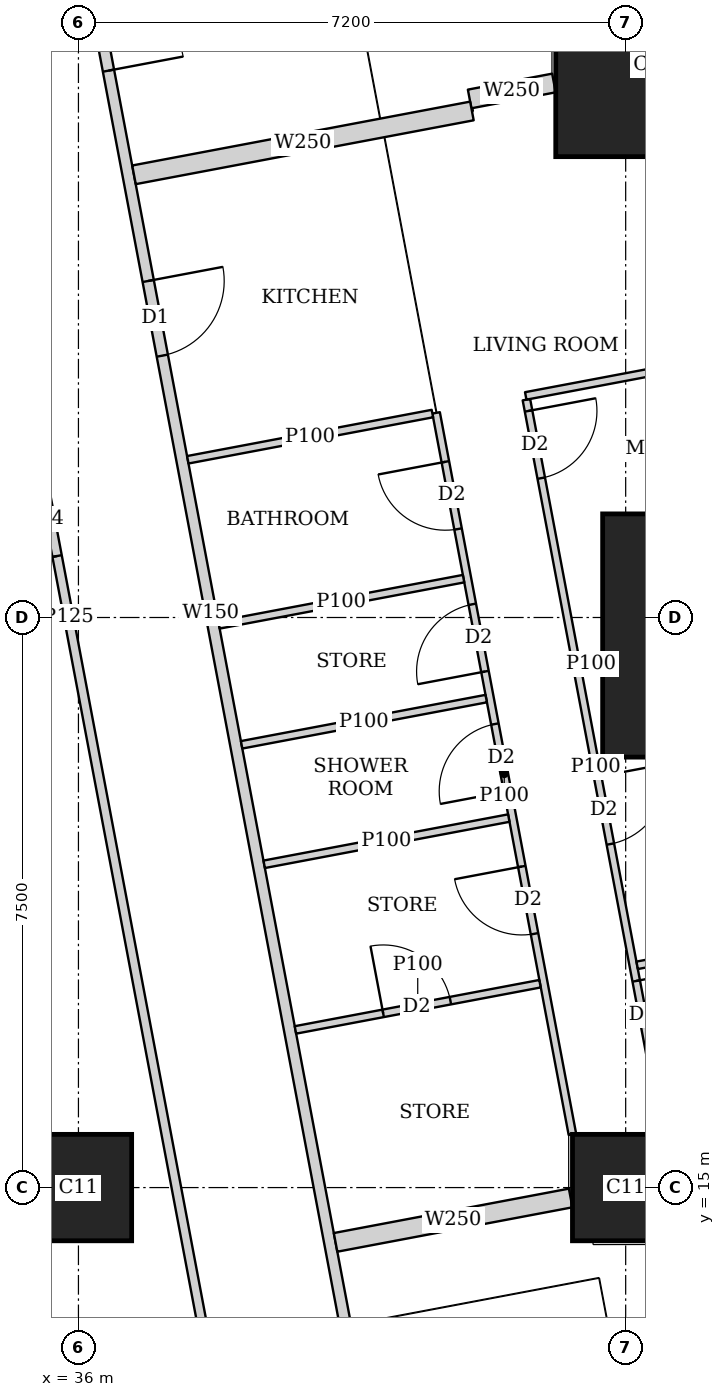
"""IFC4 building model, lengths in metres.
Left out: names, types, materials, properties, quantities, classifications, styles, units other than length and angle.
Written with IfcOpenShell. Run it as: python <this file> out.ifc"""

import sys

from ifc_helpers import new_model, si_unit, direction, frame, frame_2d, origin, origin_2d, place, context, subcontext, project, spatial, rectangle, extrude, element, fill, save


model = new_model("IFC4")
c1 = context("Model", 3, precision=1e-05, world=origin(), true_north=direction((0.0, 1.0)))
c2 = subcontext(c1, "Body", "Model", "MODEL_VIEW")
j1 = project(units=[si_unit("LENGTHUNIT", "METRE"), si_unit("PLANEANGLEUNIT", "RADIAN")], contexts=[c1])
p1 = place(None, origin())
s1 = spatial("IfcSite", under=j1, at=p1, CompositionType="ELEMENT")
p2 = place(p1, origin())
s2 = spatial("IfcBuilding", under=s1, at=p2, CompositionType="ELEMENT")
p3 = place(p2, frame((0.0, 0.0, 234.95)))
s3 = spatial("IfcBuildingStorey", under=s2, at=p3, CompositionType="ELEMENT", Elevation=234.95)
for number, where, z_axis, x_axis in (
    (1, (36.0, 15.0, 0.0), (0.0, 0.0, 1.0), (1.0, 0.0, 0.0)),
    (2, (43.2, 15.0, 0.0), (0.0, 0.0, 1.0), (1.0, 0.0, 0.0)),
):
    element("IfcColumn", number, at=place(p3, frame(where, z_axis=z_axis, x_axis=x_axis)), inside=s3, PredefinedType="COLUMN", context=c2, shape_type="SweptSolid", body=[
        extrude(rectangle(XDim=1.4, YDim=1.4, at=origin_2d()), origin(), (0.0, 0.0, 1.0), 3.75),
    ])
p4 = place(p3, frame((44.697, 22.263, 0.0), z_axis=(0.0, 0.0, 1.0), x_axis=(1.0, 0.0, 0.0)))
e3 = element("IfcColumn", 3, at=p4, inside=s3, PredefinedType="COLUMN", context=c2, shape_type="SweptSolid", body=[
    extrude(rectangle(XDim=3.6, YDim=3.2, at=origin_2d()), origin(), (0.0, 0.0, 1.0), 3.75),
])
p5 = place(p3, frame((43.48, 29.763, 0.0), z_axis=(0.0, 0.0, 1.0), x_axis=(1.0, 0.0, 0.0)))
e4 = element("IfcColumn", 4, at=p5, inside=s3, PredefinedType="COLUMN", context=c2, shape_type="SweptSolid", body=[
    extrude(rectangle(XDim=2.4, YDim=2.4, at=origin_2d()), origin(), (0.0, 0.0, 1.0), 3.75),
])
p6 = place(p3, frame((50.653, 2.703, 0.0), z_axis=(0.0, 0.0, 1.0), x_axis=(-0.185612026696, 0.982623109613, 0.0)))
e5 = element("IfcWall", 5, at=p6, inside=s3, PredefinedType="SOLIDWALL", context=c2, shape_type="SweptSolid", body=[
    extrude(rectangle(XDim=41.393, YDim=0.2, at=frame_2d((20.697, 0.0))), origin(), (0.0, 0.0, 1.0), 3.5),
])
p7 = place(p6, frame((1.633, 0.0, 0.9)))
e6 = element("IfcOpeningElement", 6, at=p7, cuts=e5, PredefinedType="OPENING", context=c2, shape_type="SweptSolid", body=[
    extrude(rectangle(XDim=1.8, YDim=1.5, at=frame_2d((0.9, 0.75))), frame((0.0, 0.11, 0.0), z_axis=(0.0, -1.0, 0.0), x_axis=(1.0, 0.0, 0.0)), (0.0, 0.0, 1.0), 0.22),
])
p8 = place(p6, frame((6.032, 0.0, 0.9)))
e7 = element("IfcOpeningElement", 7, at=p8, cuts=e5, PredefinedType="OPENING", context=c2, shape_type="SweptSolid", body=[
    extrude(rectangle(XDim=1.8, YDim=1.5, at=frame_2d((0.9, 0.75))), frame((0.0, 0.11, 0.0), z_axis=(0.0, -1.0, 0.0), x_axis=(1.0, 0.0, 0.0)), (0.0, 0.0, 1.0), 0.22),
])
p9 = place(p6, frame((9.848, 0.0, 0.9)))
e8 = element("IfcOpeningElement", 8, at=p9, cuts=e5, PredefinedType="OPENING", context=c2, shape_type="SweptSolid", body=[
    extrude(rectangle(XDim=1.8, YDim=1.5, at=frame_2d((0.9, 0.75))), frame((0.0, 0.11, 0.0), z_axis=(0.0, -1.0, 0.0), x_axis=(1.0, 0.0, 0.0)), (0.0, 0.0, 1.0), 0.22),
])
p10 = place(p6, frame((13.664, 0.0, 0.9)))
e9 = element("IfcOpeningElement", 9, at=p10, cuts=e5, PredefinedType="OPENING", context=c2, shape_type="SweptSolid", body=[
    extrude(rectangle(XDim=1.8, YDim=1.5, at=frame_2d((0.9, 0.75))), frame((0.0, 0.11, 0.0), z_axis=(0.0, -1.0, 0.0), x_axis=(1.0, 0.0, 0.0)), (0.0, 0.0, 1.0), 0.22),
])
p11 = place(p6, frame((17.481, 0.0, 0.9)))
e10 = element("IfcOpeningElement", 10, at=p11, cuts=e5, PredefinedType="OPENING", context=c2, shape_type="SweptSolid", body=[
    extrude(rectangle(XDim=1.8, YDim=1.5, at=frame_2d((0.9, 0.75))), frame((0.0, 0.11, 0.0), z_axis=(0.0, -1.0, 0.0), x_axis=(1.0, 0.0, 0.0)), (0.0, 0.0, 1.0), 0.22),
])
p12 = place(p6, frame((21.297, 0.0, 0.9)))
e11 = element("IfcOpeningElement", 11, at=p12, cuts=e5, PredefinedType="OPENING", context=c2, shape_type="SweptSolid", body=[
    extrude(rectangle(XDim=1.8, YDim=1.5, at=frame_2d((0.9, 0.75))), frame((0.0, 0.11, 0.0), z_axis=(0.0, -1.0, 0.0), x_axis=(1.0, 0.0, 0.0)), (0.0, 0.0, 1.0), 0.22),
])
p13 = place(p6, frame((25.113, 0.0, 0.9)))
e12 = element("IfcOpeningElement", 12, at=p13, cuts=e5, PredefinedType="OPENING", context=c2, shape_type="SweptSolid", body=[
    extrude(rectangle(XDim=1.8, YDim=1.5, at=frame_2d((0.9, 0.75))), frame((0.0, 0.11, 0.0), z_axis=(0.0, -1.0, 0.0), x_axis=(1.0, 0.0, 0.0)), (0.0, 0.0, 1.0), 0.22),
])
p14 = place(p6, frame((28.93, 0.0, 0.9)))
e13 = element("IfcOpeningElement", 13, at=p14, cuts=e5, PredefinedType="OPENING", context=c2, shape_type="SweptSolid", body=[
    extrude(rectangle(XDim=1.8, YDim=1.5, at=frame_2d((0.9, 0.75))), frame((0.0, 0.11, 0.0), z_axis=(0.0, -1.0, 0.0), x_axis=(1.0, 0.0, 0.0)), (0.0, 0.0, 1.0), 0.22),
])
p15 = place(p6, frame((32.746, 0.0, 0.9)))
e14 = element("IfcOpeningElement", 14, at=p15, cuts=e5, PredefinedType="OPENING", context=c2, shape_type="SweptSolid", body=[
    extrude(rectangle(XDim=1.8, YDim=1.5, at=frame_2d((0.9, 0.75))), frame((0.0, 0.11, 0.0), z_axis=(0.0, -1.0, 0.0), x_axis=(1.0, 0.0, 0.0)), (0.0, 0.0, 1.0), 0.22),
])
p16 = place(p6, frame((36.481, 0.0, 0.9)))
e15 = element("IfcOpeningElement", 15, at=p16, cuts=e5, PredefinedType="OPENING", context=c2, shape_type="SweptSolid", body=[
    extrude(rectangle(XDim=1.8, YDim=1.5, at=frame_2d((0.9, 0.75))), frame((0.0, 0.11, 0.0), z_axis=(0.0, -1.0, 0.0), x_axis=(1.0, 0.0, 0.0)), (0.0, 0.0, 1.0), 0.22),
])
p17 = place(p3, frame((33.933, 42.73, 0.0), z_axis=(0.0, 0.0, 1.0), x_axis=(0.185595417643, -0.982626246825, 0.0)))
e16 = element("IfcWall", 16, at=p17, inside=s3, PredefinedType="SOLIDWALL", context=c2, shape_type="SweptSolid", body=[
    extrude(rectangle(XDim=41.051, YDim=0.15, at=frame_2d((20.525, 0.0))), origin(), (0.0, 0.0, 1.0), 2.5),
])
p18 = place(p17, frame((12.266, 0.0, 0.0)))
e17 = element("IfcOpeningElement", 17, at=p18, cuts=e16, PredefinedType="OPENING", context=c2, shape_type="SweptSolid", body=[
    extrude(rectangle(XDim=1.0, YDim=2.1, at=frame_2d((0.5, 1.05))), frame((0.0, 0.085, 0.0), z_axis=(0.0, -1.0, 0.0), x_axis=(1.0, 0.0, 0.0)), (0.0, 0.0, 1.0), 0.17),
])
p19 = place(p17, frame((16.082, 0.0, 0.0)))
e18 = element("IfcOpeningElement", 18, at=p19, cuts=e16, PredefinedType="OPENING", context=c2, shape_type="SweptSolid", body=[
    extrude(rectangle(XDim=1.0, YDim=2.1, at=frame_2d((0.5, 1.05))), frame((0.0, 0.085, 0.0), z_axis=(0.0, -1.0, 0.0), x_axis=(1.0, 0.0, 0.0)), (0.0, 0.0, 1.0), 0.17),
])
p20 = place(p17, frame((30.862, 0.0, 0.0)))
e19 = element("IfcOpeningElement", 19, at=p20, cuts=e16, PredefinedType="OPENING", context=c2, shape_type="SweptSolid", body=[
    extrude(rectangle(XDim=1.0, YDim=2.1, at=frame_2d((0.5, 1.05))), frame((0.0, 0.085, 0.0), z_axis=(0.0, -1.0, 0.0), x_axis=(1.0, 0.0, 0.0)), (0.0, 0.0, 1.0), 0.17),
])
p21 = place(p3, frame((41.894, 25.366, 0.0), z_axis=(0.0, 0.0, 1.0), x_axis=(0.185612905165, -0.982622943675, 0.0)))
e20 = element("IfcWall", 20, at=p21, inside=s3, PredefinedType="PARTITIONING", context=c2, shape_type="SweptSolid", body=[
    extrude(rectangle(XDim=9.827, YDim=0.1, at=frame_2d((4.913, 0.0))), origin(), (0.0, 0.0, 1.0), 2.5),
])
p22 = place(p21, frame((0.151, 0.0, 0.0)))
e21 = element("IfcOpeningElement", 21, at=p22, cuts=e20, PredefinedType="OPENING", context=c2, shape_type="SweptSolid", body=[
    extrude(rectangle(XDim=0.9, YDim=2.1, at=frame_2d((0.45, 1.05))), frame((0.0, 0.06, 0.0), z_axis=(0.0, -1.0, 0.0), x_axis=(1.0, 0.0, 0.0)), (0.0, 0.0, 1.0), 0.12),
])
p23 = place(p21, frame((5.05, 0.0, 0.0)))
e22 = element("IfcOpeningElement", 22, at=p23, cuts=e20, PredefinedType="OPENING", context=c2, shape_type="SweptSolid", body=[
    extrude(rectangle(XDim=0.9, YDim=2.1, at=frame_2d((0.45, 1.05))), frame((0.0, 0.06, 0.0), z_axis=(0.0, -1.0, 0.0), x_axis=(1.0, 0.0, 0.0)), (0.0, 0.0, 1.0), 0.12),
])
p24 = place(p21, frame((7.783, 0.0, 0.0)))
e23 = element("IfcOpeningElement", 23, at=p24, cuts=e20, PredefinedType="OPENING", context=c2, shape_type="SweptSolid", body=[
    extrude(rectangle(XDim=0.9, YDim=2.1, at=frame_2d((0.45, 1.05))), frame((0.0, 0.06, 0.0), z_axis=(0.0, -1.0, 0.0), x_axis=(1.0, 0.0, 0.0)), (0.0, 0.0, 1.0), 0.12),
])
p25 = place(p3, frame((40.706, 25.192, 0.0), z_axis=(0.0, 0.0, 1.0), x_axis=(0.185629824463, -0.982619747547, 0.0)))
e24 = element("IfcWall", 24, at=p25, inside=s3, PredefinedType="PARTITIONING", context=c2, shape_type="SweptSolid", body=[
    extrude(rectangle(XDim=9.659, YDim=0.1, at=frame_2d((4.83, 0.0))), origin(), (0.0, 0.0, 1.0), 2.5),
])
p26 = place(p25, frame((0.655, 0.0, 0.0)))
e25 = element("IfcOpeningElement", 25, at=p26, cuts=e24, PredefinedType="OPENING", context=c2, shape_type="SweptSolid", body=[
    extrude(rectangle(XDim=0.9, YDim=2.1, at=frame_2d((0.45, 1.05))), frame((0.0, 0.06, 0.0), z_axis=(0.0, -1.0, 0.0), x_axis=(1.0, 0.0, 0.0)), (0.0, 0.0, 1.0), 0.12),
])
p27 = place(p25, frame((4.166, 0.0, 0.0)))
e26 = element("IfcOpeningElement", 26, at=p27, cuts=e24, PredefinedType="OPENING", context=c2, shape_type="SweptSolid", body=[
    extrude(rectangle(XDim=0.9, YDim=2.1, at=frame_2d((0.45, 1.05))), frame((0.0, 0.06, 0.0), z_axis=(0.0, -1.0, 0.0), x_axis=(1.0, 0.0, 0.0)), (0.0, 0.0, 1.0), 0.12),
])
p28 = place(p25, frame((2.563, 0.0, 0.0)))
e27 = element("IfcOpeningElement", 27, at=p28, cuts=e24, PredefinedType="OPENING", context=c2, shape_type="SweptSolid", body=[
    extrude(rectangle(XDim=0.9, YDim=2.1, at=frame_2d((0.45, 1.05))), frame((0.0, 0.06, 0.0), z_axis=(0.0, -1.0, 0.0), x_axis=(1.0, 0.0, 0.0)), (0.0, 0.0, 1.0), 0.12),
])
p29 = place(p25, frame((6.074, 0.0, 0.0)))
e28 = element("IfcOpeningElement", 28, at=p29, cuts=e24, PredefinedType="OPENING", context=c2, shape_type="SweptSolid", body=[
    extrude(rectangle(XDim=0.9, YDim=2.1, at=frame_2d((0.45, 1.05))), frame((0.0, 0.06, 0.0), z_axis=(0.0, -1.0, 0.0), x_axis=(1.0, 0.0, 0.0)), (0.0, 0.0, 1.0), 0.12),
])
p30 = place(p3, frame((46.11, 26.213, 0.0), z_axis=(0.0, 0.0, 1.0), x_axis=(-0.982633535512, -0.185556823879, 0.0)))
e29 = element("IfcWall", 29, at=p30, inside=s3, PredefinedType="PARTITIONING", context=c2, shape_type="SweptSolid", body=[
    extrude(rectangle(XDim=4.3, YDim=0.1, at=frame_2d((2.15, 0.0))), origin(), (0.0, 0.0, 1.0), 2.05),
])
p31 = place(p3, frame((42.887, 21.921, 0.0), z_axis=(0.0, 0.0, 1.0), x_axis=(-0.982688058078, -0.185267861514, 0.0)))
e30 = element("IfcWall", 30, at=p31, inside=s3, PredefinedType="PARTITIONING", context=c2, shape_type="SweptSolid", body=[
    extrude(rectangle(XDim=0.286, YDim=0.1, at=frame_2d((0.143, 0.0))), origin(), (0.0, 0.0, 1.0), 2.5),
])
p32 = place(p3, frame((47.527, 18.712, 0.0), z_axis=(0.0, 0.0, 1.0), x_axis=(-0.982665405803, -0.185387972203, 0.0)))
e31 = element("IfcWall", 31, at=p32, inside=s3, PredefinedType="PARTITIONING", context=c2, shape_type="SweptSolid", body=[
    extrude(rectangle(XDim=4.25, YDim=0.1, at=frame_2d((2.125, 0.0))), origin(), (0.0, 0.0, 1.0), 2.05),
])
for number, where, z_axis, x_axis in (
    (32, (40.657, 25.183, 0.0), (0.0, 0.0, 1.0), (-0.983, -0.186, 0.0)),
    (33, (41.365, 21.433, 0.0), (0.0, 0.0, 1.0), (-0.983, -0.186, 0.0)),
):
    element("IfcWall", number, at=place(p3, frame(where, z_axis=z_axis, x_axis=x_axis)), inside=s3, PredefinedType="PARTITIONING", context=c2, shape_type="SweptSolid", body=[
        extrude(rectangle(XDim=3.275, YDim=0.1, at=frame_2d((1.637, 0.0))), origin(), (0.0, 0.0, 1.0), 3.5),
    ])
p33 = place(p3, frame((42.073, 17.682, 0.0), z_axis=(0.0, 0.0, 1.0), x_axis=(-0.982620626894, -0.185625169636, 0.0)))
e34 = element("IfcWall", 34, at=p33, inside=s3, PredefinedType="PARTITIONING", context=c2, shape_type="SweptSolid", body=[
    extrude(rectangle(XDim=3.275, YDim=0.1, at=frame_2d((1.637, 0.0))), origin(), (0.0, 0.0, 1.0), 3.5),
])
p34 = place(p33, frame((1.2, 0.0, 0.0)))
e35 = element("IfcOpeningElement", 35, at=p34, cuts=e34, PredefinedType="OPENING", context=c2, shape_type="SweptSolid", body=[
    extrude(rectangle(XDim=0.9, YDim=2.1, at=frame_2d((0.45, 1.05))), frame((0.0, 0.06, 0.0), z_axis=(0.0, -1.0, 0.0), x_axis=(1.0, 0.0, 0.0)), (0.0, 0.0, 1.0), 0.12),
])
p35 = place(p3, frame((41.067, 23.011, 0.0), z_axis=(0.0, 0.0, 1.0), x_axis=(-0.982618057925, -0.185638768151, 0.0)))
e36 = element("IfcWall", 36, at=p35, inside=s3, PredefinedType="PARTITIONING", context=c2, shape_type="SweptSolid", body=[
    extrude(rectangle(XDim=3.275, YDim=0.1, at=frame_2d((1.637, 0.0))), origin(), (0.0, 0.0, 1.0), 2.5),
])
p36 = place(p3, frame((41.662, 19.861, 0.0), z_axis=(0.0, 0.0, 1.0), x_axis=(-0.982607026909, -0.185697147715, 0.0)))
e37 = element("IfcWall", 37, at=p36, inside=s3, PredefinedType="PARTITIONING", context=c2, shape_type="SweptSolid", body=[
    extrude(rectangle(XDim=3.275, YDim=0.1, at=frame_2d((1.637, 0.0))), origin(), (0.0, 0.0, 1.0), 3.5),
])
p37 = place(p3, frame((42.256, 29.532, 0.0), z_axis=(0.0, 0.0, 1.0), x_axis=(-0.982549954272, -0.185998890749, 0.0)))
e38 = element("IfcWall", 38, at=p37, inside=s3, PredefinedType="SOLIDWALL", context=c2, shape_type="SweptSolid", body=[
    extrude(rectangle(XDim=1.129, YDim=0.25, at=frame_2d((0.564, 0.0))), origin(), (0.0, 0.0, 1.0), 2.05),
])
p38 = place(p3, frame((41.177, 29.164, 0.0), z_axis=(0.0, 0.0, 1.0), x_axis=(-0.982612837616, -0.185666398014, 0.0)))
e39 = element("IfcWall", 39, at=p38, inside=s3, PredefinedType="SOLIDWALL", context=c2, shape_type="SweptSolid", body=[
    extrude(rectangle(XDim=4.525, YDim=0.25, at=frame_2d((2.262, 0.0))), origin(), (0.0, 0.0, 1.0), 2.5),
])
p39 = place(p3, frame((42.476, 14.863, 0.0), z_axis=(0.0, 0.0, 1.0), x_axis=(-0.982638716117, -0.185529387398, 0.0)))
e40 = element("IfcWall", 40, at=p39, inside=s3, PredefinedType="SOLIDWALL", context=c2, shape_type="SweptSolid", body=[
    extrude(rectangle(XDim=3.148, YDim=0.25, at=frame_2d((1.574, 0.0))), origin(), (0.0, 0.0, 1.0), 3.5),
])
p40 = place(p3, frame((38.202, 10.163, 0.0), z_axis=(0.0, 0.0, 1.0), x_axis=(-0.185610321132, 0.982623431783, 0.0)))
e41 = element("IfcWall", 41, at=p40, inside=s3, PredefinedType="PARTITIONING", context=c2, shape_type="SweptSolid", body=[
    extrude(rectangle(XDim=25.111, YDim=0.125, at=frame_2d((12.556, 0.0))), origin(), (0.0, 0.0, 1.0), 2.5),
])
p41 = place(p40, frame((0.708, 0.0, 0.0)))
e42 = element("IfcOpeningElement", 42, at=p41, cuts=e41, PredefinedType="OPENING", context=c2, shape_type="SweptSolid", body=[
    extrude(rectangle(XDim=1.0, YDim=2.1, at=frame_2d((0.5, 1.05))), frame((0.0, 0.073, 0.0), z_axis=(0.0, -1.0, 0.0), x_axis=(1.0, 0.0, 0.0)), (0.0, 0.0, 1.0), 0.145),
])
p42 = place(p40, frame((13.378, 0.0, 0.0)))
e43 = element("IfcOpeningElement", 43, at=p42, cuts=e41, PredefinedType="OPENING", context=c2, shape_type="SweptSolid", body=[
    extrude(rectangle(XDim=1.0, YDim=2.1, at=frame_2d((0.5, 1.05))), frame((0.0, 0.073, 0.0), z_axis=(0.0, -1.0, 0.0), x_axis=(1.0, 0.0, 0.0)), (0.0, 0.0, 1.0), 0.145),
])
p43 = place(p40, frame((21.15, 0.0, 0.0)))
e44 = element("IfcOpeningElement", 44, at=p43, cuts=e41, PredefinedType="OPENING", context=c2, shape_type="SweptSolid", body=[
    extrude(rectangle(XDim=1.0, YDim=2.1, at=frame_2d((0.5, 1.05))), frame((0.0, 0.073, 0.0), z_axis=(0.0, -1.0, 0.0), x_axis=(1.0, 0.0, 0.0)), (0.0, 0.0, 1.0), 0.145),
])
p44 = place(p40, frame((23.453, 0.0, 0.0)))
e45 = element("IfcOpeningElement", 45, at=p44, cuts=e41, PredefinedType="OPENING", context=c2, shape_type="SweptSolid", body=[
    extrude(rectangle(XDim=1.0, YDim=2.1, at=frame_2d((0.5, 1.05))), frame((0.0, 0.073, 0.0), z_axis=(0.0, -1.0, 0.0), x_axis=(1.0, 0.0, 0.0)), (0.0, 0.0, 1.0), 0.145),
])
p45 = place(p3, frame((33.701, 22.5, 0.0), z_axis=(0.0, 0.0, 1.0), x_axis=(1.0, 0.0, 0.0)))
e46 = element("IfcWall", 46, at=p45, inside=s3, PredefinedType="PARTITIONING", context=c2, shape_type="SweptSolid", body=[
    extrude(rectangle(XDim=2.095, YDim=0.125, at=frame_2d((1.047, 0.0))), origin(), (0.0, 0.0, 1.0), 2.5),
])
p46 = place(p18, origin())
e47 = element("IfcDoor", 47, at=p46, inside=s3, OperationType="SINGLE_SWING_RIGHT", PredefinedType="DOOR", context=c2, shape_type="SweptSolid", body=[
    extrude(rectangle(XDim=1.0, YDim=2.1, at=frame_2d((0.5, 1.05))), frame((0.0, 0.025, 0.0), z_axis=(0.0, -1.0, 0.0), x_axis=(1.0, 0.0, 0.0)), (0.0, 0.0, 1.0), 0.05),
])
fill(e17, e47)
p47 = place(p22, origin())
e48 = element("IfcDoor", 48, at=p47, inside=s3, OperationType="SINGLE_SWING_LEFT", PredefinedType="DOOR", context=c2, shape_type="SweptSolid", body=[
    extrude(rectangle(XDim=0.9, YDim=2.1, at=frame_2d((0.45, 1.05))), frame((0.0, 0.025, 0.0), z_axis=(0.0, -1.0, 0.0), x_axis=(1.0, 0.0, 0.0)), (0.0, 0.0, 1.0), 0.05),
])
fill(e21, e48)
p48 = place(p23, origin())
e49 = element("IfcDoor", 49, at=p48, inside=s3, OperationType="SINGLE_SWING_LEFT", PredefinedType="DOOR", context=c2, shape_type="SweptSolid", body=[
    extrude(rectangle(XDim=0.9, YDim=2.1, at=frame_2d((0.45, 1.05))), frame((0.0, 0.025, 0.0), z_axis=(0.0, -1.0, 0.0), x_axis=(1.0, 0.0, 0.0)), (0.0, 0.0, 1.0), 0.05),
])
fill(e22, e49)
p49 = place(p24, origin())
e50 = element("IfcDoor", 50, at=p49, inside=s3, OperationType="SINGLE_SWING_LEFT", PredefinedType="DOOR", context=c2, shape_type="SweptSolid", body=[
    extrude(rectangle(XDim=0.9, YDim=2.1, at=frame_2d((0.45, 1.05))), frame((0.0, 0.025, 0.0), z_axis=(0.0, -1.0, 0.0), x_axis=(1.0, 0.0, 0.0)), (0.0, 0.0, 1.0), 0.05),
])
fill(e23, e50)
p50 = place(p26, origin())
e51 = element("IfcDoor", 51, at=p50, inside=s3, OperationType="SINGLE_SWING_RIGHT", PredefinedType="DOOR", context=c2, shape_type="SweptSolid", body=[
    extrude(rectangle(XDim=0.9, YDim=2.1, at=frame_2d((0.45, 1.05))), frame((0.0, 0.025, 0.0), z_axis=(0.0, -1.0, 0.0), x_axis=(1.0, 0.0, 0.0)), (0.0, 0.0, 1.0), 0.05),
])
fill(e25, e51)
p51 = place(p27, origin())
e52 = element("IfcDoor", 52, at=p51, inside=s3, OperationType="SINGLE_SWING_LEFT", PredefinedType="DOOR", context=c2, shape_type="SweptSolid", body=[
    extrude(rectangle(XDim=0.9, YDim=2.1, at=frame_2d((0.45, 1.05))), frame((0.0, 0.025, 0.0), z_axis=(0.0, -1.0, 0.0), x_axis=(1.0, 0.0, 0.0)), (0.0, 0.0, 1.0), 0.05),
])
fill(e26, e52)
p52 = place(p28, origin())
e53 = element("IfcDoor", 53, at=p52, inside=s3, OperationType="SINGLE_SWING_LEFT", PredefinedType="DOOR", context=c2, shape_type="SweptSolid", body=[
    extrude(rectangle(XDim=0.9, YDim=2.1, at=frame_2d((0.45, 1.05))), frame((0.0, 0.025, 0.0), z_axis=(0.0, -1.0, 0.0), x_axis=(1.0, 0.0, 0.0)), (0.0, 0.0, 1.0), 0.05),
])
fill(e27, e53)
p53 = place(p29, origin())
e54 = element("IfcDoor", 54, at=p53, inside=s3, OperationType="SINGLE_SWING_RIGHT", PredefinedType="DOOR", context=c2, shape_type="SweptSolid", body=[
    extrude(rectangle(XDim=0.9, YDim=2.1, at=frame_2d((0.45, 1.05))), frame((0.0, 0.025, 0.0), z_axis=(0.0, -1.0, 0.0), x_axis=(1.0, 0.0, 0.0)), (0.0, 0.0, 1.0), 0.05),
])
fill(e28, e54)
p54 = place(p19, origin())
e55 = element("IfcDoor", 55, at=p54, inside=s3, OperationType="SINGLE_SWING_LEFT", PredefinedType="DOOR", context=c2, shape_type="SweptSolid", body=[
    extrude(rectangle(XDim=1.0, YDim=2.1, at=frame_2d((0.5, 1.05))), frame((0.0, 0.025, 0.0), z_axis=(0.0, -1.0, 0.0), x_axis=(1.0, 0.0, 0.0)), (0.0, 0.0, 1.0), 0.05),
])
fill(e18, e55)
p55 = place(p34, origin())
e56 = element("IfcDoor", 56, at=p55, inside=s3, OperationType="SINGLE_SWING_LEFT", PredefinedType="DOOR", context=c2, shape_type="SweptSolid", body=[
    extrude(rectangle(XDim=0.9, YDim=2.1, at=frame_2d((0.45, 1.05))), frame((0.0, 0.025, 0.0), z_axis=(0.0, -1.0, 0.0), x_axis=(1.0, 0.0, 0.0)), (0.0, 0.0, 1.0), 0.05),
])
fill(e35, e56)
p56 = place(p42, origin())
e57 = element("IfcDoor", 57, at=p56, inside=s3, OperationType="SINGLE_SWING_LEFT", PredefinedType="DOOR", context=c2, shape_type="SweptSolid", body=[
    extrude(rectangle(XDim=1.0, YDim=2.1, at=frame_2d((0.5, 1.05))), frame((0.0, 0.025, 0.0), z_axis=(0.0, -1.0, 0.0), x_axis=(1.0, 0.0, 0.0)), (0.0, 0.0, 1.0), 0.05),
])
fill(e43, e57)
save(model, sys.argv[1])
